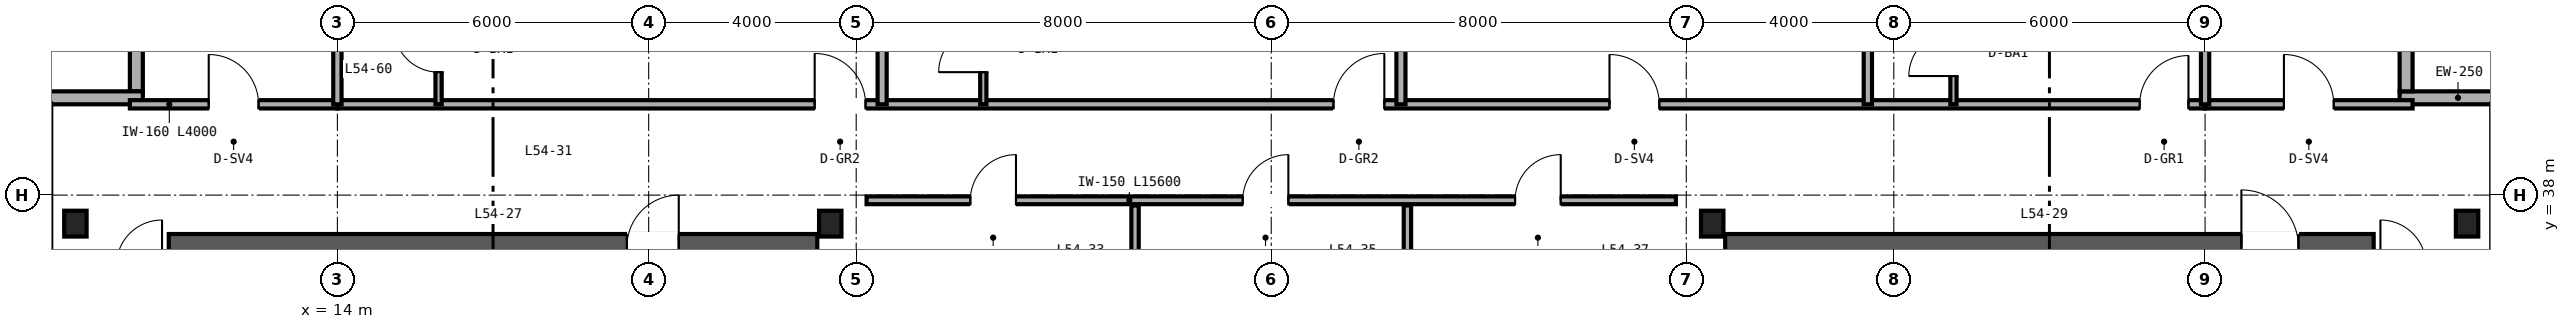
"""IFC4 building model, lengths in metres.
Left out: names, types, materials, properties, quantities, classifications, styles, units other than length and angle.
Written with IfcOpenShell. Run it as: python <this file> out.ifc"""

import sys

from ifc_helpers import new_model, si_unit, direction, frame, frame_2d, origin, origin_2d, place, context, subcontext, project, spatial, rectangle, i_section, extrude, source, transform, mapped, element, fill, save


model = new_model("IFC4")
c1 = context("Model", 3, precision=1e-05, world=origin(), true_north=direction((0.0, 1.0)))
c2 = subcontext(c1, "Body", "Model", "MODEL_VIEW")
j1 = project(units=[si_unit("LENGTHUNIT", "METRE"), si_unit("PLANEANGLEUNIT", "RADIAN")], contexts=[c1])
p1 = place(None, origin())
s1 = spatial("IfcSite", under=j1, at=p1, CompositionType="ELEMENT")
p2 = place(p1, origin())
s2 = spatial("IfcBuilding", under=s1, at=p2, CompositionType="ELEMENT")
p3 = place(p2, frame((0.0, 0.0, 213.6)))
s3 = spatial("IfcBuildingStorey", under=s2, at=p3, CompositionType="ELEMENT", Elevation=213.6)
p4 = place(p3, frame((10.75, 37.0, 0.0), z_axis=(0.0, 0.0, 1.0), x_axis=(1.0, 0.0, 0.0)))
e1 = element("IfcWall", 1, at=p4, inside=s3, PredefinedType="SHEAR", context=c2, shape_type="SweptSolid", body=[
    extrude(rectangle(XDim=12.5, YDim=0.5, at=frame_2d((6.25, 0.0))), origin(), (0.0, 0.0, 1.0), 3.37),
])
p5 = place(p4, frame((8.83, 0.0, 0.0)))
e2 = element("IfcOpeningElement", 2, at=p5, cuts=e1, PredefinedType="OPENING", context=c2, shape_type="SweptSolid", body=[
    extrude(rectangle(XDim=1.0, YDim=2.15, at=frame_2d((0.5, 1.075))), frame((0.0, 0.26, 0.0), z_axis=(0.0, -1.0, 0.0), x_axis=(1.0, 0.0, 0.0)), (0.0, 0.0, 1.0), 0.52),
])
p6 = place(p3, frame((40.75, 37.0, 0.0), z_axis=(0.0, 0.0, 1.0), x_axis=(1.0, 0.0, 0.0)))
e3 = element("IfcWall", 3, at=p6, inside=s3, PredefinedType="SHEAR", context=c2, shape_type="SweptSolid", body=[
    extrude(rectangle(XDim=12.5, YDim=0.5, at=frame_2d((6.25, 0.0))), origin(), (0.0, 0.0, 1.0), 3.37),
])
p7 = place(p6, frame((9.95, 0.0, 0.0)))
e4 = element("IfcOpeningElement", 4, at=p7, cuts=e3, PredefinedType="OPENING", context=c2, shape_type="SweptSolid", body=[
    extrude(rectangle(XDim=1.1, YDim=2.15, at=frame_2d((0.55, 1.075))), frame((0.0, 0.26, 0.0), z_axis=(0.0, -1.0, 0.0), x_axis=(1.0, 0.0, 0.0)), (0.0, 0.0, 1.0), 0.52),
])
m1 = source(origin(), c2, "Body", "SweptSolid", [
    extrude(i_section(OverallWidth=0.432, OverallDepth=0.498, WebThickness=0.056, FlangeThickness=0.089, FilletRadius=0.025, at=origin_2d()), origin(), (0.0, 0.0, 1.0), 3.37),
])
for number, where, z_axis, x_axis in (
    (5, (8.95, 37.45, 0.0), (0.0, 0.0, 1.0), (1.0, 0.0, 0.0)),
    (6, (23.5, 37.45, 0.0), (0.0, 0.0, 1.0), (1.0, 0.0, 0.0)),
    (7, (40.5, 37.45, 0.0), (0.0, 0.0, 1.0), (1.0, 0.0, 0.0)),
    (8, (55.05, 37.45, 0.0), (0.0, 0.0, 1.0), (1.0, 0.0, 0.0)),
):
    element("IfcColumn", number, at=place(p3, frame(where, z_axis=z_axis, x_axis=x_axis)), inside=s3, PredefinedType="COLUMN", context=c2, shape_type="MappedRepresentation", body=[
        mapped(m1, transform((0.0, 0.0, 0.0), scale=1.0)),
    ])
p8 = place(p3, frame((56.0, 39.875, 0.0), z_axis=(0.0, 0.0, 1.0), x_axis=(-1.0, 0.0, 0.0)))
e9 = element("IfcWall", 9, at=p8, inside=s3, PredefinedType="SOLIDWALL", context=c2, shape_type="SweptSolid", body=[
    extrude(rectangle(XDim=2.25, YDim=0.25, at=frame_2d((1.125, 0.0))), origin(), (0.0, 0.0, 1.0), 3.37),
])
for number, where, z_axis, x_axis in (
    (10, (53.875, 40.0, 0.0), (0.0, 0.0, 1.0), (0.0, 1.0, 0.0)),
    (11, (10.125, 42.0, 0.0), (0.0, 0.0, 1.0), (0.0, -1.0, 0.0)),
):
    element("IfcWall", number, at=place(p3, frame(where, z_axis=z_axis, x_axis=x_axis)), inside=s3, PredefinedType="SOLIDWALL", context=c2, shape_type="SweptSolid", body=[
        extrude(rectangle(XDim=2.0, YDim=0.25, at=frame_2d((1.0, 0.0))), origin(), (0.0, 0.0, 1.0), 3.37),
    ])
p9 = place(p3, frame((10.25, 39.875, 0.0), z_axis=(0.0, 0.0, 1.0), x_axis=(-1.0, 0.0, 0.0)))
e12 = element("IfcWall", 12, at=p9, inside=s3, PredefinedType="SOLIDWALL", context=c2, shape_type="SweptSolid", body=[
    extrude(rectangle(XDim=2.25, YDim=0.25, at=frame_2d((1.125, 0.0))), origin(), (0.0, 0.0, 1.0), 3.37),
])
p10 = place(p3, frame((24.2, 37.9, 0.0), z_axis=(0.0, 0.0, 1.0), x_axis=(1.0, 0.0, 0.0)))
e13 = element("IfcWall", 13, at=p10, inside=s3, PredefinedType="PARTITIONING", context=c2, shape_type="SweptSolid", body=[
    extrude(rectangle(XDim=15.6, YDim=0.15, at=frame_2d((7.8, 0.0))), origin(), (0.0, 0.0, 1.0), 3.37),
])
p11 = place(p10, frame((2.0, 0.0, 0.0)))
e14 = element("IfcOpeningElement", 14, at=p11, cuts=e13, PredefinedType="OPENING", context=c2, shape_type="SweptSolid", body=[
    extrude(rectangle(XDim=0.88, YDim=2.15, at=frame_2d((0.44, 1.075))), frame((0.0, 0.085, 0.0), z_axis=(0.0, -1.0, 0.0), x_axis=(1.0, 0.0, 0.0)), (0.0, 0.0, 1.0), 0.17),
])
p12 = place(p10, frame((7.25, 0.0, 0.0)))
e15 = element("IfcOpeningElement", 15, at=p12, cuts=e13, PredefinedType="OPENING", context=c2, shape_type="SweptSolid", body=[
    extrude(rectangle(XDim=0.88, YDim=2.15, at=frame_2d((0.44, 1.075))), frame((0.0, 0.085, 0.0), z_axis=(0.0, -1.0, 0.0), x_axis=(1.0, 0.0, 0.0)), (0.0, 0.0, 1.0), 0.17),
])
p13 = place(p10, frame((12.5, 0.0, 0.0)))
e16 = element("IfcOpeningElement", 16, at=p13, cuts=e13, PredefinedType="OPENING", context=c2, shape_type="SweptSolid", body=[
    extrude(rectangle(XDim=0.88, YDim=2.15, at=frame_2d((0.44, 1.075))), frame((0.0, 0.085, 0.0), z_axis=(0.0, -1.0, 0.0), x_axis=(1.0, 0.0, 0.0)), (0.0, 0.0, 1.0), 0.17),
])
for number, where, z_axis, x_axis in (
    (17, (29.375, 36.12, 0.0), (0.0, 0.0, 1.0), (0.0, 1.0, 0.0)),
    (18, (34.625, 36.12, 0.0), (0.0, 0.0, 1.0), (0.0, 1.0, 0.0)),
):
    element("IfcWall", number, at=place(p3, frame(where, z_axis=z_axis, x_axis=x_axis)), inside=s3, PredefinedType="PARTITIONING", context=c2, shape_type="SweptSolid", body=[
        extrude(rectangle(XDim=1.68, YDim=0.142, at=frame_2d((0.84, 0.0))), origin(), (0.0, 0.0, 1.0), 3.37),
    ])
p14 = place(p3, frame((10.0, 39.75, 0.0), z_axis=(0.0, 0.0, 1.0), x_axis=(1.0, 0.0, 0.0)))
e19 = element("IfcWall", 19, at=p14, inside=s3, PredefinedType="PARTITIONING", context=c2, shape_type="SweptSolid", body=[
    extrude(rectangle(XDim=4.0, YDim=0.16, at=frame_2d((2.0, 0.0))), origin(), (0.0, 0.0, 1.0), 3.37),
])
p15 = place(p14, frame((1.52, 0.0, 0.0)))
e20 = element("IfcOpeningElement", 20, at=p15, cuts=e19, PredefinedType="OPENING", context=c2, shape_type="SweptSolid", body=[
    extrude(rectangle(XDim=0.96, YDim=2.15, at=frame_2d((0.48, 1.075))), frame((0.0, 0.09, 0.0), z_axis=(0.0, -1.0, 0.0), x_axis=(1.0, 0.0, 0.0)), (0.0, 0.0, 1.0), 0.18),
])
p16 = place(p3, frame((50.0, 39.75, 0.0), z_axis=(0.0, 0.0, 1.0), x_axis=(1.0, 0.0, 0.0)))
e21 = element("IfcWall", 21, at=p16, inside=s3, PredefinedType="PARTITIONING", context=c2, shape_type="SweptSolid", body=[
    extrude(rectangle(XDim=4.0, YDim=0.16, at=frame_2d((2.0, 0.0))), origin(), (0.0, 0.0, 1.0), 3.37),
])
p17 = place(p16, frame((1.52, 0.0, 0.0)))
e22 = element("IfcOpeningElement", 22, at=p17, cuts=e21, PredefinedType="OPENING", context=c2, shape_type="SweptSolid", body=[
    extrude(rectangle(XDim=0.96, YDim=2.15, at=frame_2d((0.48, 1.075))), frame((0.0, 0.09, 0.0), z_axis=(0.0, -1.0, 0.0), x_axis=(1.0, 0.0, 0.0)), (0.0, 0.0, 1.0), 0.18),
])
p18 = place(p3, frame((14.0, 39.75, 0.0), z_axis=(0.0, 0.0, 1.0), x_axis=(1.0, 0.0, 0.0)))
e23 = element("IfcWall", 23, at=p18, inside=s3, PredefinedType="PARTITIONING", context=c2, shape_type="SweptSolid", body=[
    extrude(rectangle(XDim=36.0, YDim=0.16, at=frame_2d((18.0, 0.0))), origin(), (0.0, 0.0, 1.0), 2.913),
])
p19 = place(p18, frame((9.2, 0.0, 0.0)))
e24 = element("IfcOpeningElement", 24, at=p19, cuts=e23, PredefinedType="OPENING", context=c2, shape_type="SweptSolid", body=[
    extrude(rectangle(XDim=0.98, YDim=2.2, at=frame_2d((0.49, 1.1))), frame((0.0, 0.09, 0.0), z_axis=(0.0, -1.0, 0.0), x_axis=(1.0, 0.0, 0.0)), (0.0, 0.0, 1.0), 0.18),
])
p20 = place(p18, frame((19.2, 0.0, 0.0)))
e25 = element("IfcOpeningElement", 25, at=p20, cuts=e23, PredefinedType="OPENING", context=c2, shape_type="SweptSolid", body=[
    extrude(rectangle(XDim=0.98, YDim=2.2, at=frame_2d((0.49, 1.1))), frame((0.0, 0.09, 0.0), z_axis=(0.0, -1.0, 0.0), x_axis=(1.0, 0.0, 0.0)), (0.0, 0.0, 1.0), 0.18),
])
p21 = place(p18, frame((24.52, 0.0, 0.0)))
e26 = element("IfcOpeningElement", 26, at=p21, cuts=e23, PredefinedType="OPENING", context=c2, shape_type="SweptSolid", body=[
    extrude(rectangle(XDim=0.96, YDim=2.15, at=frame_2d((0.48, 1.075))), frame((0.0, 0.09, 0.0), z_axis=(0.0, -1.0, 0.0), x_axis=(1.0, 0.0, 0.0)), (0.0, 0.0, 1.0), 0.18),
])
p22 = place(p18, frame((34.74, 0.0, 0.0)))
e27 = element("IfcOpeningElement", 27, at=p22, cuts=e23, PredefinedType="OPENING", context=c2, shape_type="SweptSolid", body=[
    extrude(rectangle(XDim=0.94, YDim=2.15, at=frame_2d((0.47, 1.075))), frame((0.0, 0.09, 0.0), z_axis=(0.0, -1.0, 0.0), x_axis=(1.0, 0.0, 0.0)), (0.0, 0.0, 1.0), 0.18),
])
for number, where, z_axis, x_axis in (
    (28, (14.0, 39.75, 0.0), (0.0, 0.0, 1.0), (0.0, 1.0, 0.0)),
    (29, (50.0, 39.75, 0.0), (0.0, 0.0, 1.0), (0.0, 1.0, 0.0)),
):
    element("IfcWall", number, at=place(p3, frame(where, z_axis=z_axis, x_axis=x_axis)), inside=s3, PredefinedType="PARTITIONING", context=c2, shape_type="SweptSolid", body=[
        extrude(rectangle(XDim=5.89, YDim=0.16, at=frame_2d((2.945, 0.0))), origin(), (0.0, 0.0, 1.0), 2.677),
    ])
p23 = place(p3, frame((24.5, 39.75, 0.0), z_axis=(0.0, 0.0, 1.0), x_axis=(0.0, 1.0, 0.0)))
e30 = element("IfcWall", 30, at=p23, inside=s3, PredefinedType="PARTITIONING", context=c2, shape_type="SweptSolid", body=[
    extrude(rectangle(XDim=5.89, YDim=0.175, at=frame_2d((2.945, 0.0))), origin(), (0.0, 0.0, 1.0), 2.443),
])
p24 = place(p3, frame((15.95, 39.75, 0.0), z_axis=(0.0, 0.0, 1.0), x_axis=(0.0, 1.0, 0.0)))
e31 = element("IfcWall", 31, at=p24, inside=s3, PredefinedType="PARTITIONING", context=c2, shape_type="SweptSolid", body=[
    extrude(rectangle(XDim=2.1, YDim=0.12, at=frame_2d((1.05, 0.0))), origin(), (0.0, 0.0, 1.0), 3.37),
])
p25 = place(p24, frame((0.62, 0.0, 0.0)))
e32 = element("IfcOpeningElement", 32, at=p25, cuts=e31, PredefinedType="OPENING", context=c2, shape_type="SweptSolid", body=[
    extrude(rectangle(XDim=0.86, YDim=2.1, at=frame_2d((0.43, 1.05))), frame((0.0, 0.07, 0.0), z_axis=(0.0, -1.0, 0.0), x_axis=(1.0, 0.0, 0.0)), (0.0, 0.0, 1.0), 0.14),
])
p26 = place(p3, frame((34.5, 39.75, 0.0), z_axis=(0.0, 0.0, 1.0), x_axis=(0.0, 1.0, 0.0)))
e33 = element("IfcWall", 33, at=p26, inside=s3, PredefinedType="PARTITIONING", context=c2, shape_type="SweptSolid", body=[
    extrude(rectangle(XDim=5.89, YDim=0.175, at=frame_2d((2.945, 0.0))), origin(), (0.0, 0.0, 1.0), 2.443),
])
p27 = place(p3, frame((26.45, 39.75, 0.0), z_axis=(0.0, 0.0, 1.0), x_axis=(0.0, 1.0, 0.0)))
e34 = element("IfcWall", 34, at=p27, inside=s3, PredefinedType="PARTITIONING", context=c2, shape_type="SweptSolid", body=[
    extrude(rectangle(XDim=2.1, YDim=0.12, at=frame_2d((1.05, 0.0))), origin(), (0.0, 0.0, 1.0), 3.37),
])
p28 = place(p27, frame((0.62, 0.0, 0.0)))
e35 = element("IfcOpeningElement", 35, at=p28, cuts=e34, PredefinedType="OPENING", context=c2, shape_type="SweptSolid", body=[
    extrude(rectangle(XDim=0.86, YDim=2.1, at=frame_2d((0.43, 1.05))), frame((0.0, 0.07, 0.0), z_axis=(0.0, -1.0, 0.0), x_axis=(1.0, 0.0, 0.0)), (0.0, 0.0, 1.0), 0.14),
])
p29 = place(p3, frame((43.5, 39.75, 0.0), z_axis=(0.0, 0.0, 1.0), x_axis=(0.0, 1.0, 0.0)))
e36 = element("IfcWall", 36, at=p29, inside=s3, PredefinedType="PARTITIONING", context=c2, shape_type="SweptSolid", body=[
    extrude(rectangle(XDim=5.89, YDim=0.16, at=frame_2d((2.945, 0.0))), origin(), (0.0, 0.0, 1.0), 2.833),
])
p30 = place(p3, frame((45.15, 39.75, 0.0), z_axis=(0.0, 0.0, 1.0), x_axis=(0.0, 1.0, 0.0)))
e37 = element("IfcWall", 37, at=p30, inside=s3, PredefinedType="PARTITIONING", context=c2, shape_type="SweptSolid", body=[
    extrude(rectangle(XDim=1.95, YDim=0.12, at=frame_2d((0.975, 0.0))), origin(), (0.0, 0.0, 1.0), 3.37),
])
p31 = place(p30, frame((0.545, 0.0, 0.0)))
e38 = element("IfcOpeningElement", 38, at=p31, cuts=e37, PredefinedType="OPENING", context=c2, shape_type="SweptSolid", body=[
    extrude(rectangle(XDim=0.86, YDim=2.1, at=frame_2d((0.43, 1.05))), frame((0.0, 0.07, 0.0), z_axis=(0.0, -1.0, 0.0), x_axis=(1.0, 0.0, 0.0)), (0.0, 0.0, 1.0), 0.14),
])
m2 = source(origin(), c2, "Body", "SweptSolid", [
    extrude(rectangle(XDim=1.0, YDim=2.15, at=frame_2d((0.5, 1.075))), frame((0.0, 0.025, 0.0), z_axis=(0.0, -1.0, 0.0), x_axis=(1.0, 0.0, 0.0)), (0.0, 0.0, 1.0), 0.05),
])
p32 = place(p5, origin())
e39 = element("IfcDoor", 39, at=p32, inside=s3, OperationType="SINGLE_SWING_RIGHT", PredefinedType="DOOR", context=c2, shape_type="MappedRepresentation", body=[
    mapped(m2, transform((0.0, 0.0, 0.0), scale=1.0)),
])
fill(e2, e39)
m3 = source(origin(), c2, "Body", "SweptSolid", [
    extrude(rectangle(XDim=1.1, YDim=2.15, at=frame_2d((0.55, 1.075))), frame((0.0, 0.025, 0.0), z_axis=(0.0, -1.0, 0.0), x_axis=(1.0, 0.0, 0.0)), (0.0, 0.0, 1.0), 0.05),
])
p33 = place(p7, origin())
e40 = element("IfcDoor", 40, at=p33, inside=s3, OperationType="SINGLE_SWING_LEFT", PredefinedType="DOOR", context=c2, shape_type="MappedRepresentation", body=[
    mapped(m3, transform((0.0, 0.0, 0.0), scale=1.0)),
])
fill(e4, e40)
m4 = source(origin(), c2, "Body", "SweptSolid", [
    extrude(rectangle(XDim=0.88, YDim=2.15, at=frame_2d((0.44, 1.075))), frame((0.0, 0.025, 0.0), z_axis=(0.0, -1.0, 0.0), x_axis=(1.0, 0.0, 0.0)), (0.0, 0.0, 1.0), 0.05),
])
p34 = place(p11, origin())
e41 = element("IfcDoor", 41, at=p34, inside=s3, OperationType="SINGLE_SWING_RIGHT", PredefinedType="DOOR", context=c2, shape_type="MappedRepresentation", body=[
    mapped(m4, transform((0.0, 0.0, 0.0), scale=1.0)),
])
fill(e14, e41)
p35 = place(p12, origin())
e42 = element("IfcDoor", 42, at=p35, inside=s3, OperationType="SINGLE_SWING_RIGHT", PredefinedType="DOOR", context=c2, shape_type="MappedRepresentation", body=[
    mapped(m4, transform((0.0, 0.0, 0.0), scale=1.0)),
])
fill(e15, e42)
p36 = place(p13, origin())
e43 = element("IfcDoor", 43, at=p36, inside=s3, OperationType="SINGLE_SWING_RIGHT", PredefinedType="DOOR", context=c2, shape_type="MappedRepresentation", body=[
    mapped(m4, transform((0.0, 0.0, 0.0), scale=1.0)),
])
fill(e16, e43)
m5 = source(origin(), c2, "Body", "SweptSolid", [
    extrude(rectangle(XDim=0.96, YDim=2.15, at=frame_2d((0.48, 1.075))), frame((0.0, 0.025, 0.0), z_axis=(0.0, -1.0, 0.0), x_axis=(1.0, 0.0, 0.0)), (0.0, 0.0, 1.0), 0.05),
])
p37 = place(p15, origin())
e44 = element("IfcDoor", 44, at=p37, inside=s3, OperationType="SINGLE_SWING_LEFT", PredefinedType="DOOR", context=c2, shape_type="MappedRepresentation", body=[
    mapped(m5, transform((0.0, 0.0, 0.0), scale=1.0)),
])
fill(e20, e44)
p38 = place(p17, origin())
e45 = element("IfcDoor", 45, at=p38, inside=s3, OperationType="SINGLE_SWING_LEFT", PredefinedType="DOOR", context=c2, shape_type="MappedRepresentation", body=[
    mapped(m5, transform((0.0, 0.0, 0.0), scale=1.0)),
])
fill(e22, e45)
m6 = source(origin(), c2, "Body", "SweptSolid", [
    extrude(rectangle(XDim=0.86, YDim=2.1, at=frame_2d((0.43, 1.05))), frame((0.0, 0.025, 0.0), z_axis=(0.0, -1.0, 0.0), x_axis=(1.0, 0.0, 0.0)), (0.0, 0.0, 1.0), 0.05),
])
p39 = place(p25, origin())
e46 = element("IfcDoor", 46, at=p39, inside=s3, OperationType="SINGLE_SWING_RIGHT", PredefinedType="DOOR", context=c2, shape_type="MappedRepresentation", body=[
    mapped(m6, transform((0.0, 0.0, 0.0), scale=1.0)),
])
fill(e32, e46)
p40 = place(p28, origin())
e47 = element("IfcDoor", 47, at=p40, inside=s3, OperationType="SINGLE_SWING_LEFT", PredefinedType="DOOR", context=c2, shape_type="MappedRepresentation", body=[
    mapped(m6, transform((0.0, 0.0, 0.0), scale=1.0)),
])
fill(e35, e47)
p41 = place(p31, origin())
e48 = element("IfcDoor", 48, at=p41, inside=s3, OperationType="SINGLE_SWING_LEFT", PredefinedType="DOOR", context=c2, shape_type="MappedRepresentation", body=[
    mapped(m6, transform((0.0, 0.0, 0.0), scale=1.0)),
])
fill(e38, e48)
m7 = source(origin(), c2, "Body", "SweptSolid", [
    extrude(rectangle(XDim=0.98, YDim=2.2, at=frame_2d((0.49, 1.1))), frame((0.0, 0.025, 0.0), z_axis=(0.0, -1.0, 0.0), x_axis=(1.0, 0.0, 0.0)), (0.0, 0.0, 1.0), 0.05),
])
p42 = place(p19, origin())
e49 = element("IfcDoor", 49, at=p42, inside=s3, OperationType="SINGLE_SWING_LEFT", PredefinedType="DOOR", context=c2, shape_type="MappedRepresentation", body=[
    mapped(m7, transform((0.0, 0.0, 0.0), scale=1.0)),
])
fill(e24, e49)
p43 = place(p20, origin())
e50 = element("IfcDoor", 50, at=p43, inside=s3, OperationType="SINGLE_SWING_RIGHT", PredefinedType="DOOR", context=c2, shape_type="MappedRepresentation", body=[
    mapped(m7, transform((0.0, 0.0, 0.0), scale=1.0)),
])
fill(e25, e50)
p44 = place(p21, origin())
e51 = element("IfcDoor", 51, at=p44, inside=s3, OperationType="SINGLE_SWING_LEFT", PredefinedType="DOOR", context=c2, shape_type="MappedRepresentation", body=[
    mapped(m5, transform((0.0, 0.0, 0.0), scale=1.0)),
])
fill(e26, e51)
m8 = source(origin(), c2, "Body", "SweptSolid", [
    extrude(rectangle(XDim=0.94, YDim=2.15, at=frame_2d((0.47, 1.075))), frame((0.0, 0.025, 0.0), z_axis=(0.0, -1.0, 0.0), x_axis=(1.0, 0.0, 0.0)), (0.0, 0.0, 1.0), 0.05),
])
p45 = place(p22, origin())
e52 = element("IfcDoor", 52, at=p45, inside=s3, OperationType="SINGLE_SWING_RIGHT", PredefinedType="DOOR", context=c2, shape_type="MappedRepresentation", body=[
    mapped(m8, transform((0.0, 0.0, 0.0), scale=1.0)),
])
fill(e27, e52)
save(model, sys.argv[1])
